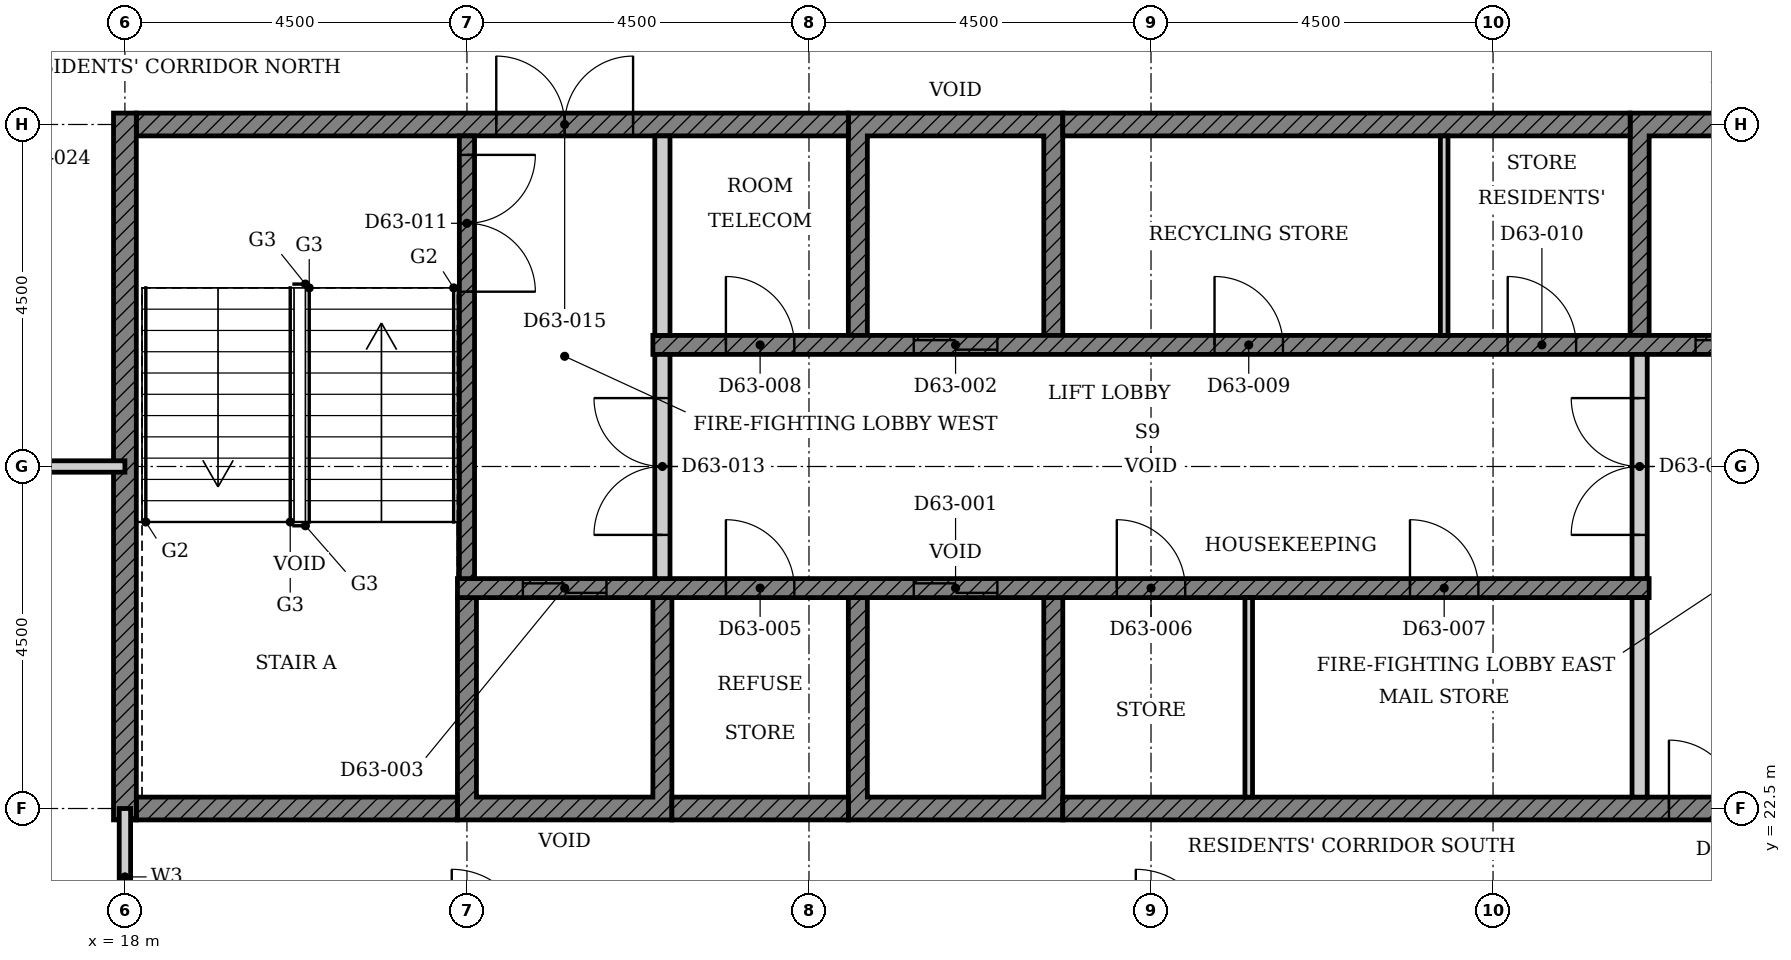
"""IFC4 building model, lengths in metres.
Left out: names, types, materials, properties, quantities, classifications, styles, units other than length and angle.
Written with IfcOpenShell. Run it as: python <this file> out.ifc"""

import sys

from ifc_helpers import new_model, si_unit, direction, frame, frame_2d, origin, place, context, subcontext, project, spatial, polyline, rectangle, outline, extrude, element, fill, save


model = new_model("IFC4")
c1 = context("Model", 3, precision=1e-05, world=origin(), true_north=direction((0.0, 1.0)))
c2 = subcontext(c1, "Body", "Model", "MODEL_VIEW")
j1 = project(units=[si_unit("LENGTHUNIT", "METRE"), si_unit("PLANEANGLEUNIT", "RADIAN")], contexts=[c1])
p1 = place(None, origin())
s1 = spatial("IfcSite", under=j1, at=p1, CompositionType="ELEMENT")
p2 = place(p1, origin())
s2 = spatial("IfcBuilding", under=s1, at=p2, CompositionType="ELEMENT")
p3 = place(p2, frame((0.0, 0.0, 249.0)))
s3 = spatial("IfcBuildingStorey", under=s2, at=p3, CompositionType="ELEMENT", Elevation=249.0)
p4 = place(p3, origin())
e1 = element("IfcWall", 1, at=p4, inside=s3, PredefinedType="SHEAR", context=c2, shape_type="SweptSolid", body=[
    extrude(outline(polyline([(22.375, 22.35), (25.197, 22.35), (25.197, 25.275), (24.947, 25.275), (24.947, 22.65), (22.625, 22.65), (22.625, 25.275), (22.375, 25.275), (22.375, 22.35)])), origin(), (0.0, 0.0, 1.0), 3.4),
])
p5 = place(p3, origin())
e2 = element("IfcWall", 2, at=p5, inside=s3, PredefinedType="SHEAR", context=c2, shape_type="SweptSolid", body=[
    extrude(outline(polyline([(27.518, 22.35), (30.339, 22.35), (30.339, 25.275), (30.089, 25.275), (30.089, 22.65), (27.768, 22.65), (27.768, 25.275), (27.518, 25.275), (27.518, 22.35)])), origin(), (0.0, 0.0, 1.0), 3.4),
])
p6 = place(p3, origin())
e3 = element("IfcWall", 3, at=p6, inside=s3, PredefinedType="SHEAR", context=c2, shape_type="SweptSolid", body=[
    extrude(outline(polyline([(27.518, 28.725), (27.768, 28.725), (27.768, 31.35), (30.089, 31.35), (30.089, 28.725), (30.339, 28.725), (30.339, 31.65), (27.518, 31.65), (27.518, 28.725)])), origin(), (0.0, 0.0, 1.0), 3.4),
])
p7 = place(p3, origin())
e4 = element("IfcWall", 4, at=p7, inside=s3, PredefinedType="SHEAR", context=c2, shape_type="SweptSolid", body=[
    extrude(outline(polyline([(37.803, 28.725), (38.053, 28.725), (38.053, 31.35), (40.375, 31.35), (40.375, 28.725), (40.625, 28.725), (40.625, 31.65), (37.803, 31.65), (37.803, 28.725)])), origin(), (0.0, 0.0, 1.0), 3.4),
])
p8 = place(p3, frame((18.15, 22.5, 0.0), z_axis=(0.0, 0.0, 1.0), x_axis=(1.0, 0.0, 0.0)))
e5 = element("IfcWall", 5, at=p8, inside=s3, PredefinedType="SHEAR", context=c2, shape_type="SweptSolid", body=[
    extrude(rectangle(XDim=4.225, YDim=0.3, at=frame_2d((2.113, 0.0))), origin(), (0.0, 0.0, 1.0), 3.4),
])
p9 = place(p3, frame((25.197, 22.5, 0.0), z_axis=(0.0, 0.0, 1.0), x_axis=(1.0, 0.0, 0.0)))
e6 = element("IfcWall", 6, at=p9, inside=s3, PredefinedType="SHEAR", context=c2, shape_type="SweptSolid", body=[
    extrude(rectangle(XDim=2.321, YDim=0.3, at=frame_2d((1.161, 0.0))), origin(), (0.0, 0.0, 1.0), 3.4),
])
p10 = place(p3, frame((30.339, 22.5, 0.0), z_axis=(0.0, 0.0, 1.0), x_axis=(1.0, 0.0, 0.0)))
e7 = element("IfcWall", 7, at=p10, inside=s3, PredefinedType="SHEAR", context=c2, shape_type="SweptSolid", body=[
    extrude(rectangle(XDim=14.511, YDim=0.3, at=frame_2d((7.255, 0.0))), origin(), (0.0, 0.0, 1.0), 3.4),
])
p11 = place(p10, frame((7.975, 0.0, 0.0)))
e8 = element("IfcOpeningElement", 8, at=p11, cuts=e7, PredefinedType="OPENING", context=c2, shape_type="SweptSolid", body=[
    extrude(rectangle(XDim=1.8, YDim=2.1, at=frame_2d((0.9, 1.05))), frame((0.0, 0.16, 0.0), z_axis=(0.0, -1.0, 0.0), x_axis=(1.0, 0.0, 0.0)), (0.0, 0.0, 1.0), 0.32),
])
p12 = place(p3, frame((18.15, 31.5, 0.0), z_axis=(0.0, 0.0, 1.0), x_axis=(1.0, 0.0, 0.0)))
e9 = element("IfcWall", 9, at=p12, inside=s3, PredefinedType="SHEAR", context=c2, shape_type="SweptSolid", body=[
    extrude(rectangle(XDim=9.368, YDim=0.3, at=frame_2d((4.684, 0.0))), origin(), (0.0, 0.0, 1.0), 3.4),
])
p13 = place(p12, frame((4.736, 0.0, 0.0)))
e10 = element("IfcOpeningElement", 10, at=p13, cuts=e9, PredefinedType="OPENING", context=c2, shape_type="SweptSolid", body=[
    extrude(rectangle(XDim=1.8, YDim=2.1, at=frame_2d((0.9, 1.05))), frame((0.0, 0.16, 0.0), z_axis=(0.0, -1.0, 0.0), x_axis=(1.0, 0.0, 0.0)), (0.0, 0.0, 1.0), 0.32),
])
p14 = place(p3, frame((30.339, 31.5, 0.0), z_axis=(0.0, 0.0, 1.0), x_axis=(1.0, 0.0, 0.0)))
e11 = element("IfcWall", 11, at=p14, inside=s3, PredefinedType="SHEAR", context=c2, shape_type="SweptSolid", body=[
    extrude(rectangle(XDim=7.464, YDim=0.3, at=frame_2d((3.732, 0.0))), origin(), (0.0, 0.0, 1.0), 3.4),
])
p15 = place(p3, frame((18.0, 22.35, 0.0), z_axis=(0.0, 0.0, 1.0), x_axis=(0.0, 1.0, 0.0)))
e12 = element("IfcWall", 12, at=p15, inside=s3, PredefinedType="SHEAR", context=c2, shape_type="SweptSolid", body=[
    extrude(rectangle(XDim=9.3, YDim=0.3, at=frame_2d((4.65, 0.0))), origin(), (0.0, 0.0, 1.0), 3.4),
])
p16 = place(p3, frame((22.375, 25.4, 0.0), z_axis=(0.0, 0.0, 1.0), x_axis=(1.0, 0.0, 0.0)))
e13 = element("IfcWall", 13, at=p16, inside=s3, PredefinedType="SHEAR", context=c2, shape_type="SweptSolid", body=[
    extrude(rectangle(XDim=15.678, YDim=0.25, at=frame_2d((7.839, 0.0))), origin(), (0.0, 0.0, 1.0), 3.4),
])
p17 = place(p16, frame((6.004, 0.0, 0.0)))
e14 = element("IfcOpeningElement", 14, at=p17, cuts=e13, PredefinedType="OPENING", context=c2, shape_type="SweptSolid", body=[
    extrude(rectangle(XDim=1.1, YDim=2.1, at=frame_2d((0.55, 1.05))), frame((0.0, 0.135, 0.0), z_axis=(0.0, -1.0, 0.0), x_axis=(1.0, 0.0, 0.0)), (0.0, 0.0, 1.0), 0.27),
])
p18 = place(p16, frame((0.861, 0.0, 0.0)))
e15 = element("IfcOpeningElement", 15, at=p18, cuts=e13, PredefinedType="OPENING", context=c2, shape_type="SweptSolid", body=[
    extrude(rectangle(XDim=1.1, YDim=2.1, at=frame_2d((0.55, 1.05))), frame((0.0, 0.135, 0.0), z_axis=(0.0, -1.0, 0.0), x_axis=(1.0, 0.0, 0.0)), (0.0, 0.0, 1.0), 0.27),
])
p19 = place(p16, frame((3.532, 0.0, 0.0)))
e16 = element("IfcOpeningElement", 16, at=p19, cuts=e13, PredefinedType="OPENING", context=c2, shape_type="SweptSolid", body=[
    extrude(rectangle(XDim=0.9, YDim=2.1, at=frame_2d((0.45, 1.05))), frame((0.0, 0.135, 0.0), z_axis=(0.0, -1.0, 0.0), x_axis=(1.0, 0.0, 0.0)), (0.0, 0.0, 1.0), 0.27),
])
p20 = place(p16, frame((8.675, 0.0, 0.0)))
e17 = element("IfcOpeningElement", 17, at=p20, cuts=e13, PredefinedType="OPENING", context=c2, shape_type="SweptSolid", body=[
    extrude(rectangle(XDim=0.9, YDim=2.1, at=frame_2d((0.45, 1.05))), frame((0.0, 0.135, 0.0), z_axis=(0.0, -1.0, 0.0), x_axis=(1.0, 0.0, 0.0)), (0.0, 0.0, 1.0), 0.27),
])
p21 = place(p16, frame((12.532, 0.0, 0.0)))
e18 = element("IfcOpeningElement", 18, at=p21, cuts=e13, PredefinedType="OPENING", context=c2, shape_type="SweptSolid", body=[
    extrude(rectangle(XDim=0.9, YDim=2.1, at=frame_2d((0.45, 1.05))), frame((0.0, 0.135, 0.0), z_axis=(0.0, -1.0, 0.0), x_axis=(1.0, 0.0, 0.0)), (0.0, 0.0, 1.0), 0.27),
])
p22 = place(p3, frame((24.947, 28.6, 0.0), z_axis=(0.0, 0.0, 1.0), x_axis=(1.0, 0.0, 0.0)))
e19 = element("IfcWall", 19, at=p22, inside=s3, PredefinedType="SHEAR", context=c2, shape_type="SweptSolid", body=[
    extrude(rectangle(XDim=15.678, YDim=0.25, at=frame_2d((7.839, 0.0))), origin(), (0.0, 0.0, 1.0), 3.4),
])
p23 = place(p22, frame((3.432, 0.0, 0.0)))
e20 = element("IfcOpeningElement", 20, at=p23, cuts=e19, PredefinedType="OPENING", context=c2, shape_type="SweptSolid", body=[
    extrude(rectangle(XDim=1.1, YDim=2.1, at=frame_2d((0.55, 1.05))), frame((0.0, 0.135, 0.0), z_axis=(0.0, -1.0, 0.0), x_axis=(1.0, 0.0, 0.0)), (0.0, 0.0, 1.0), 0.27),
])
p24 = place(p22, frame((13.718, 0.0, 0.0)))
e21 = element("IfcOpeningElement", 21, at=p24, cuts=e19, PredefinedType="OPENING", context=c2, shape_type="SweptSolid", body=[
    extrude(rectangle(XDim=1.1, YDim=2.1, at=frame_2d((0.55, 1.05))), frame((0.0, 0.135, 0.0), z_axis=(0.0, -1.0, 0.0), x_axis=(1.0, 0.0, 0.0)), (0.0, 0.0, 1.0), 0.27),
])
p25 = place(p22, frame((0.961, 0.0, 0.0)))
e22 = element("IfcOpeningElement", 22, at=p25, cuts=e19, PredefinedType="OPENING", context=c2, shape_type="SweptSolid", body=[
    extrude(rectangle(XDim=0.9, YDim=2.1, at=frame_2d((0.45, 1.05))), frame((0.0, 0.135, 0.0), z_axis=(0.0, -1.0, 0.0), x_axis=(1.0, 0.0, 0.0)), (0.0, 0.0, 1.0), 0.27),
])
p26 = place(p22, frame((7.389, 0.0, 0.0)))
e23 = element("IfcOpeningElement", 23, at=p26, cuts=e19, PredefinedType="OPENING", context=c2, shape_type="SweptSolid", body=[
    extrude(rectangle(XDim=0.9, YDim=2.1, at=frame_2d((0.45, 1.05))), frame((0.0, 0.135, 0.0), z_axis=(0.0, -1.0, 0.0), x_axis=(1.0, 0.0, 0.0)), (0.0, 0.0, 1.0), 0.27),
])
p27 = place(p22, frame((11.246, 0.0, 0.0)))
e24 = element("IfcOpeningElement", 24, at=p27, cuts=e19, PredefinedType="OPENING", context=c2, shape_type="SweptSolid", body=[
    extrude(rectangle(XDim=0.9, YDim=2.1, at=frame_2d((0.45, 1.05))), frame((0.0, 0.135, 0.0), z_axis=(0.0, -1.0, 0.0), x_axis=(1.0, 0.0, 0.0)), (0.0, 0.0, 1.0), 0.27),
])
p28 = place(p3, frame((37.928, 22.65, 0.0), z_axis=(0.0, 0.0, 1.0), x_axis=(0.0, 1.0, 0.0)))
e25 = element("IfcWall", 25, at=p28, inside=s3, PredefinedType="PARTITIONING", context=c2, shape_type="SweptSolid", body=[
    extrude(rectangle(XDim=2.625, YDim=0.2, at=frame_2d((1.312, 0.0))), origin(), (0.0, 0.0, 1.0), 3.4),
])
p29 = place(p3, frame((32.786, 22.65, 0.0), z_axis=(0.0, 0.0, 1.0), x_axis=(0.0, 1.0, 0.0)))
e26 = element("IfcWall", 26, at=p29, inside=s3, PredefinedType="PARTITIONING", context=c2, shape_type="SweptSolid", body=[
    extrude(rectangle(XDim=2.625, YDim=0.1, at=frame_2d((1.312, 0.0))), origin(), (0.0, 0.0, 1.0), 3.4),
])
p30 = place(p3, frame((25.072, 28.725, 0.0), z_axis=(0.0, 0.0, 1.0), x_axis=(0.0, 1.0, 0.0)))
e27 = element("IfcWall", 27, at=p30, inside=s3, PredefinedType="PARTITIONING", context=c2, shape_type="SweptSolid", body=[
    extrude(rectangle(XDim=2.625, YDim=0.2, at=frame_2d((1.312, 0.0))), origin(), (0.0, 0.0, 1.0), 3.4),
])
p31 = place(p3, frame((35.357, 28.725, 0.0), z_axis=(0.0, 0.0, 1.0), x_axis=(0.0, 1.0, 0.0)))
e28 = element("IfcWall", 28, at=p31, inside=s3, PredefinedType="PARTITIONING", context=c2, shape_type="SweptSolid", body=[
    extrude(rectangle(XDim=2.625, YDim=0.1, at=frame_2d((1.312, 0.0))), origin(), (0.0, 0.0, 1.0), 3.4),
])
p32 = place(p3, frame((22.5, 31.35, 0.0), z_axis=(0.0, 0.0, 1.0), x_axis=(0.0, -1.0, 0.0)))
e29 = element("IfcWall", 29, at=p32, inside=s3, PredefinedType="SHEAR", context=c2, shape_type="SweptSolid", body=[
    extrude(rectangle(XDim=5.825, YDim=0.2, at=frame_2d((2.913, 0.0))), origin(), (0.0, 0.0, 1.0), 3.4),
])
p33 = place(p32, frame((0.25, 0.0, 0.0)))
e30 = element("IfcOpeningElement", 30, at=p33, cuts=e29, PredefinedType="OPENING", context=c2, shape_type="SweptSolid", body=[
    extrude(rectangle(XDim=1.8, YDim=2.1, at=frame_2d((0.9, 1.05))), frame((0.0, 0.11, 0.0), z_axis=(0.0, -1.0, 0.0), x_axis=(1.0, 0.0, 0.0)), (0.0, 0.0, 1.0), 0.22),
])
p34 = place(p3, frame((25.072, 25.525, 0.0), z_axis=(0.0, 0.0, 1.0), x_axis=(0.0, 1.0, 0.0)))
e31 = element("IfcWall", 31, at=p34, inside=s3, PredefinedType="PARTITIONING", context=c2, shape_type="SweptSolid", body=[
    extrude(rectangle(XDim=2.95, YDim=0.2, at=frame_2d((1.475, 0.0))), origin(), (0.0, 0.0, 1.0), 3.4),
])
p35 = place(p34, frame((0.575, 0.0, 0.0)))
e32 = element("IfcOpeningElement", 32, at=p35, cuts=e31, PredefinedType="OPENING", context=c2, shape_type="SweptSolid", body=[
    extrude(rectangle(XDim=1.8, YDim=2.1, at=frame_2d((0.9, 1.05))), frame((0.0, 0.11, 0.0), z_axis=(0.0, -1.0, 0.0), x_axis=(1.0, 0.0, 0.0)), (0.0, 0.0, 1.0), 0.22),
])
p36 = place(p3, frame((37.928, 25.525, 0.0), z_axis=(0.0, 0.0, 1.0), x_axis=(0.0, 1.0, 0.0)))
e33 = element("IfcWall", 33, at=p36, inside=s3, PredefinedType="PARTITIONING", context=c2, shape_type="SweptSolid", body=[
    extrude(rectangle(XDim=2.95, YDim=0.2, at=frame_2d((1.475, 0.0))), origin(), (0.0, 0.0, 1.0), 3.4),
])
p37 = place(p36, frame((0.575, 0.0, 0.0)))
e34 = element("IfcOpeningElement", 34, at=p37, cuts=e33, PredefinedType="OPENING", context=c2, shape_type="SweptSolid", body=[
    extrude(rectangle(XDim=1.8, YDim=2.1, at=frame_2d((0.9, 1.05))), frame((0.0, 0.11, 0.0), z_axis=(0.0, -1.0, 0.0), x_axis=(1.0, 0.0, 0.0)), (0.0, 0.0, 1.0), 0.22),
])
p38 = place(p3, frame((4.5, 27.0, 0.0), z_axis=(0.0, 0.0, 1.0), x_axis=(1.0, 0.0, 0.0)))
e35 = element("IfcWall", 35, at=p38, inside=s3, PredefinedType="PARTITIONING", context=c2, shape_type="SweptSolid", body=[
    extrude(rectangle(XDim=13.5, YDim=0.15, at=frame_2d((6.75, 0.0))), origin(), (0.0, 0.0, 1.0), 2.68),
])
p39 = place(p38, frame((5.35, 0.0, 0.0)))
e36 = element("IfcOpeningElement", 36, at=p39, cuts=e35, PredefinedType="OPENING", context=c2, shape_type="SweptSolid", body=[
    extrude(rectangle(XDim=1.0, YDim=2.1, at=frame_2d((0.5, 1.05))), frame((0.0, 0.085, 0.0), z_axis=(0.0, -1.0, 0.0), x_axis=(1.0, 0.0, 0.0)), (0.0, 0.0, 1.0), 0.17),
])
p40 = place(p3, frame((18.0, 20.7, 0.0), z_axis=(0.0, 0.0, 1.0), x_axis=(0.0, 1.0, 0.0)))
e37 = element("IfcWall", 37, at=p40, inside=s3, PredefinedType="PARTITIONING", context=c2, shape_type="SweptSolid", body=[
    extrude(rectangle(XDim=1.8, YDim=0.15, at=frame_2d((0.9, 0.0))), origin(), (0.0, 0.0, 1.0), 3.4),
])
p41 = place(p17, origin())
e38 = element("IfcDoor", 38, at=p41, inside=s3, OperationType="DOUBLE_DOOR_SLIDING", PredefinedType="DOOR", context=c2, shape_type="SweptSolid", body=[
    extrude(rectangle(XDim=1.1, YDim=2.1, at=frame_2d((0.55, 1.05))), frame((0.0, 0.025, 0.0), z_axis=(0.0, -1.0, 0.0), x_axis=(1.0, 0.0, 0.0)), (0.0, 0.0, 1.0), 0.05),
])
fill(e14, e38)
p42 = place(p23, origin())
e39 = element("IfcDoor", 39, at=p42, inside=s3, OperationType="DOUBLE_DOOR_SLIDING", PredefinedType="DOOR", context=c2, shape_type="SweptSolid", body=[
    extrude(rectangle(XDim=1.1, YDim=2.1, at=frame_2d((0.55, 1.05))), frame((0.0, 0.025, 0.0), z_axis=(0.0, -1.0, 0.0), x_axis=(1.0, 0.0, 0.0)), (0.0, 0.0, 1.0), 0.05),
])
fill(e20, e39)
p43 = place(p18, origin())
e40 = element("IfcDoor", 40, at=p43, inside=s3, OperationType="DOUBLE_DOOR_SLIDING", PredefinedType="DOOR", context=c2, shape_type="SweptSolid", body=[
    extrude(rectangle(XDim=1.1, YDim=2.1, at=frame_2d((0.55, 1.05))), frame((0.0, 0.025, 0.0), z_axis=(0.0, -1.0, 0.0), x_axis=(1.0, 0.0, 0.0)), (0.0, 0.0, 1.0), 0.05),
])
fill(e15, e40)
p44 = place(p24, origin())
e41 = element("IfcDoor", 41, at=p44, inside=s3, OperationType="DOUBLE_DOOR_SLIDING", PredefinedType="DOOR", context=c2, shape_type="SweptSolid", body=[
    extrude(rectangle(XDim=1.1, YDim=2.1, at=frame_2d((0.55, 1.05))), frame((0.0, 0.025, 0.0), z_axis=(0.0, -1.0, 0.0), x_axis=(1.0, 0.0, 0.0)), (0.0, 0.0, 1.0), 0.05),
])
fill(e21, e41)
p45 = place(p19, origin())
e42 = element("IfcDoor", 42, at=p45, inside=s3, OperationType="SINGLE_SWING_LEFT", PredefinedType="DOOR", context=c2, shape_type="SweptSolid", body=[
    extrude(rectangle(XDim=0.9, YDim=2.1, at=frame_2d((0.45, 1.05))), frame((0.0, 0.025, 0.0), z_axis=(0.0, -1.0, 0.0), x_axis=(1.0, 0.0, 0.0)), (0.0, 0.0, 1.0), 0.05),
])
fill(e16, e42)
p46 = place(p20, origin())
e43 = element("IfcDoor", 43, at=p46, inside=s3, OperationType="SINGLE_SWING_LEFT", PredefinedType="DOOR", context=c2, shape_type="SweptSolid", body=[
    extrude(rectangle(XDim=0.9, YDim=2.1, at=frame_2d((0.45, 1.05))), frame((0.0, 0.025, 0.0), z_axis=(0.0, -1.0, 0.0), x_axis=(1.0, 0.0, 0.0)), (0.0, 0.0, 1.0), 0.05),
])
fill(e17, e43)
p47 = place(p21, origin())
e44 = element("IfcDoor", 44, at=p47, inside=s3, OperationType="SINGLE_SWING_LEFT", PredefinedType="DOOR", context=c2, shape_type="SweptSolid", body=[
    extrude(rectangle(XDim=0.9, YDim=2.1, at=frame_2d((0.45, 1.05))), frame((0.0, 0.025, 0.0), z_axis=(0.0, -1.0, 0.0), x_axis=(1.0, 0.0, 0.0)), (0.0, 0.0, 1.0), 0.05),
])
fill(e18, e44)
p48 = place(p25, origin())
e45 = element("IfcDoor", 45, at=p48, inside=s3, OperationType="SINGLE_SWING_LEFT", PredefinedType="DOOR", context=c2, shape_type="SweptSolid", body=[
    extrude(rectangle(XDim=0.9, YDim=2.1, at=frame_2d((0.45, 1.05))), frame((0.0, 0.025, 0.0), z_axis=(0.0, -1.0, 0.0), x_axis=(1.0, 0.0, 0.0)), (0.0, 0.0, 1.0), 0.05),
])
fill(e22, e45)
p49 = place(p26, origin())
e46 = element("IfcDoor", 46, at=p49, inside=s3, OperationType="SINGLE_SWING_LEFT", PredefinedType="DOOR", context=c2, shape_type="SweptSolid", body=[
    extrude(rectangle(XDim=0.9, YDim=2.1, at=frame_2d((0.45, 1.05))), frame((0.0, 0.025, 0.0), z_axis=(0.0, -1.0, 0.0), x_axis=(1.0, 0.0, 0.0)), (0.0, 0.0, 1.0), 0.05),
])
fill(e23, e46)
p50 = place(p27, origin())
e47 = element("IfcDoor", 47, at=p50, inside=s3, OperationType="SINGLE_SWING_LEFT", PredefinedType="DOOR", context=c2, shape_type="SweptSolid", body=[
    extrude(rectangle(XDim=0.9, YDim=2.1, at=frame_2d((0.45, 1.05))), frame((0.0, 0.025, 0.0), z_axis=(0.0, -1.0, 0.0), x_axis=(1.0, 0.0, 0.0)), (0.0, 0.0, 1.0), 0.05),
])
fill(e24, e47)
p51 = place(p33, origin())
e48 = element("IfcDoor", 48, at=p51, inside=s3, OperationType="DOUBLE_DOOR_SINGLE_SWING", PredefinedType="DOOR", context=c2, shape_type="SweptSolid", body=[
    extrude(rectangle(XDim=1.8, YDim=2.1, at=frame_2d((0.9, 1.05))), frame((0.0, 0.025, 0.0), z_axis=(0.0, -1.0, 0.0), x_axis=(1.0, 0.0, 0.0)), (0.0, 0.0, 1.0), 0.05),
])
fill(e30, e48)
p52 = place(p35, origin())
e49 = element("IfcDoor", 49, at=p52, inside=s3, OperationType="DOUBLE_DOOR_SINGLE_SWING", PredefinedType="DOOR", context=c2, shape_type="SweptSolid", body=[
    extrude(rectangle(XDim=1.8, YDim=2.1, at=frame_2d((0.9, 1.05))), frame((0.0, 0.025, 0.0), z_axis=(0.0, -1.0, 0.0), x_axis=(1.0, 0.0, 0.0)), (0.0, 0.0, 1.0), 0.05),
])
fill(e32, e49)
p53 = place(p37, origin())
e50 = element("IfcDoor", 50, at=p53, inside=s3, OperationType="DOUBLE_DOOR_SINGLE_SWING", PredefinedType="DOOR", context=c2, shape_type="SweptSolid", body=[
    extrude(rectangle(XDim=1.8, YDim=2.1, at=frame_2d((0.9, 1.05))), frame((0.0, 0.025, 0.0), z_axis=(0.0, -1.0, 0.0), x_axis=(1.0, 0.0, 0.0)), (0.0, 0.0, 1.0), 0.05),
])
fill(e34, e50)
p54 = place(p13, origin())
e51 = element("IfcDoor", 51, at=p54, inside=s3, OperationType="DOUBLE_DOOR_SINGLE_SWING", PredefinedType="DOOR", context=c2, shape_type="SweptSolid", body=[
    extrude(rectangle(XDim=1.8, YDim=2.1, at=frame_2d((0.9, 1.05))), frame((0.0, 0.025, 0.0), z_axis=(0.0, -1.0, 0.0), x_axis=(1.0, 0.0, 0.0)), (0.0, 0.0, 1.0), 0.05),
])
fill(e10, e51)
p55 = place(p11, origin())
e52 = element("IfcDoor", 52, at=p55, inside=s3, OperationType="DOUBLE_DOOR_SINGLE_SWING", PredefinedType="DOOR", context=c2, shape_type="SweptSolid", body=[
    extrude(rectangle(XDim=1.8, YDim=2.1, at=frame_2d((0.9, 1.05))), frame((0.0, 0.025, 0.0), z_axis=(0.0, -1.0, 0.0), x_axis=(1.0, 0.0, 0.0)), (0.0, 0.0, 1.0), 0.05),
])
fill(e8, e52)
save(model, sys.argv[1])
